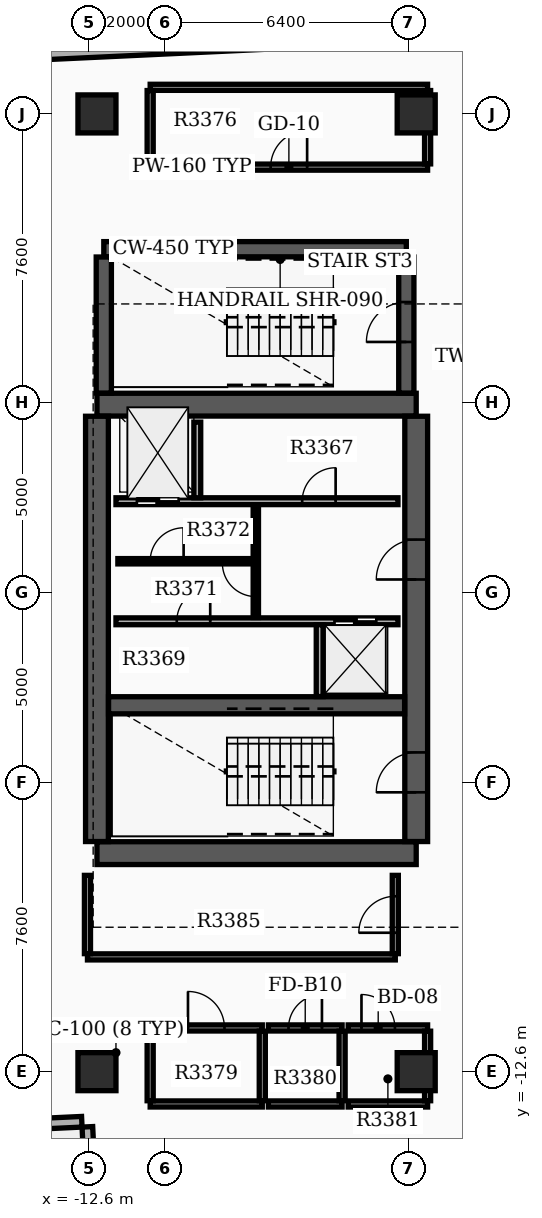
"""IFC4 building model, lengths in metres.
Left out: names, types, materials, properties, quantities, classifications, styles, units other than length and angle.
Written with IfcOpenShell. Run it as: python <this file> out.ifc"""

import sys

from ifc_helpers import new_model, si_unit, direction, frame, frame_2d, origin, origin_2d, place, context, subcontext, project, spatial, rectangle, extrude, element, fill, save


model = new_model("IFC4")
c1 = context("Model", 3, precision=1e-05, world=origin(), true_north=direction((0.0, 1.0)))
c2 = subcontext(c1, "Body", "Model", "MODEL_VIEW")
j1 = project(units=[si_unit("LENGTHUNIT", "METRE"), si_unit("PLANEANGLEUNIT", "RADIAN")], contexts=[c1])
p1 = place(None, origin())
s1 = spatial("IfcSite", under=j1, at=p1, CompositionType="ELEMENT")
p2 = place(p1, origin())
s2 = spatial("IfcBuilding", under=s1, at=p2, CompositionType="ELEMENT")
p3 = place(p2, frame((0.0, 0.0, 213.0)))
s3 = spatial("IfcBuildingStorey", under=s2, at=p3, CompositionType="ELEMENT", Elevation=213.0)
for number, where, z_axis, x_axis in (
    (1, (-12.4, -6.85, 0.0), (0.0, 0.0, 1.0), (1.0, 0.0, 0.0)),
    (2, (-12.4, 4.95, 0.0), (0.0, 0.0, 1.0), (1.0, 0.0, 0.0)),
):
    element("IfcWall", number, at=place(p3, frame(where, z_axis=z_axis, x_axis=x_axis)), inside=s3, PredefinedType="SHEAR", context=c2, shape_type="SweptSolid", body=[
        extrude(rectangle(XDim=8.4, YDim=0.6, at=frame_2d((4.2, 0.0))), origin(), (0.0, 0.0, 1.0), 3.7),
    ])
p4 = place(p3, frame((-12.4, -6.545, 0.0), z_axis=(0.0, 0.0, 1.0), x_axis=(0.0, 1.0, 0.0)))
e3 = element("IfcWall", 3, at=p4, inside=s3, PredefinedType="SHEAR", context=c2, shape_type="SweptSolid", body=[
    extrude(rectangle(XDim=11.19, YDim=0.6, at=frame_2d((5.595, 0.0))), origin(), (0.0, 0.0, 1.0), 3.7),
])
p5 = place(p3, frame((-4.0, -6.545, 0.0), z_axis=(0.0, 0.0, 1.0), x_axis=(0.0, 1.0, 0.0)))
e4 = element("IfcWall", 4, at=p5, inside=s3, PredefinedType="SHEAR", context=c2, shape_type="SweptSolid", body=[
    extrude(rectangle(XDim=11.19, YDim=0.6, at=frame_2d((5.595, 0.0))), origin(), (0.0, 0.0, 1.0), 3.7),
])
p6 = place(p5, frame((1.295, 0.0, 0.0)))
e5 = element("IfcOpeningElement", 5, at=p6, cuts=e4, PredefinedType="OPENING", context=c2, shape_type="SweptSolid", body=[
    extrude(rectangle(XDim=1.05, YDim=2.15, at=frame_2d((0.525, 1.075))), frame((0.0, 0.31, 0.0), z_axis=(0.0, -1.0, 0.0), x_axis=(1.0, 0.0, 0.0)), (0.0, 0.0, 1.0), 0.62),
])
p7 = place(p5, frame((6.895, 0.0, 0.0)))
e6 = element("IfcOpeningElement", 6, at=p7, cuts=e4, PredefinedType="OPENING", context=c2, shape_type="SweptSolid", body=[
    extrude(rectangle(XDim=1.05, YDim=2.15, at=frame_2d((0.525, 1.075))), frame((0.0, 0.31, 0.0), z_axis=(0.0, -1.0, 0.0), x_axis=(1.0, 0.0, 0.0)), (0.0, 0.0, 1.0), 0.62),
])
p8 = place(p3, frame((-12.095, -2.96, 0.0), z_axis=(0.0, 0.0, 1.0), x_axis=(1.0, 0.0, 0.0)))
e7 = element("IfcWall", 7, at=p8, inside=s3, PredefinedType="SHEAR", context=c2, shape_type="SweptSolid", body=[
    extrude(rectangle(XDim=7.79, YDim=0.45, at=frame_2d((3.895, 0.0))), origin(), (0.0, 0.0, 1.0), 3.7),
])
p9 = place(p3, frame((-12.22, 9.04, 0.0), z_axis=(0.0, 0.0, 1.0), x_axis=(1.0, 0.0, 0.0)))
e8 = element("IfcWall", 8, at=p9, inside=s3, PredefinedType="SHEAR", context=c2, shape_type="SweptSolid", body=[
    extrude(rectangle(XDim=7.96, YDim=0.4, at=frame_2d((3.98, 0.0))), origin(), (0.0, 0.0, 1.0), 3.7),
])
p10 = place(p3, frame((-12.22, 5.255, 0.0), z_axis=(0.0, 0.0, 1.0), x_axis=(0.0, 1.0, 0.0)))
e9 = element("IfcWall", 9, at=p10, inside=s3, PredefinedType="SHEAR", context=c2, shape_type="SweptSolid", body=[
    extrude(rectangle(XDim=3.58, YDim=0.4, at=frame_2d((1.79, 0.0))), origin(), (0.0, 0.0, 1.0), 3.7),
])
p11 = place(p3, frame((-4.26, 5.255, 0.0), z_axis=(0.0, 0.0, 1.0), x_axis=(0.0, 1.0, 0.0)))
e10 = element("IfcWall", 10, at=p11, inside=s3, PredefinedType="SHEAR", context=c2, shape_type="SweptSolid", body=[
    extrude(rectangle(XDim=3.58, YDim=0.4, at=frame_2d((1.79, 0.0))), origin(), (0.0, 0.0, 1.0), 3.7),
])
p12 = place(p11, frame((1.345, 0.0, 0.0)))
e11 = element("IfcOpeningElement", 11, at=p12, cuts=e10, PredefinedType="OPENING", context=c2, shape_type="SweptSolid", body=[
    extrude(rectangle(XDim=1.05, YDim=2.15, at=frame_2d((0.525, 1.075))), frame((0.0, 0.21, 0.0), z_axis=(0.0, -1.0, 0.0), x_axis=(1.0, 0.0, 0.0)), (0.0, 0.0, 1.0), 0.42),
])
for number, where, z_axis, x_axis in (
    (12, (-12.4, -12.6, 0.0), (0.0, 0.0, 1.0), (1.0, 0.0, 0.0)),
    (13, (-12.4, 12.6, 0.0), (0.0, 0.0, 1.0), (1.0, 0.0, 0.0)),
    (14, (-4.0, -12.6, 0.0), (0.0, 0.0, 1.0), (1.0, 0.0, 0.0)),
    (15, (-4.0, 12.6, 0.0), (0.0, 0.0, 1.0), (1.0, 0.0, 0.0)),
):
    element("IfcColumn", number, at=place(p3, frame(where, z_axis=z_axis, x_axis=x_axis)), inside=s3, PredefinedType="COLUMN", context=c2, shape_type="SweptSolid", body=[
        extrude(rectangle(XDim=1.0, YDim=1.0, at=origin_2d()), origin(), (0.0, 0.0, 1.0), 3.9),
    ])
p13 = place(p3, frame((-13.843, 14.164, 0.0), z_axis=(0.0, 0.0, 1.0), x_axis=(0.998889082162, 0.047123258997, 0.0)))
e16 = element("IfcWall", 16, at=p13, inside=s3, PredefinedType="STANDARD", context=c2, shape_type="SweptSolid", body=[
    extrude(rectangle(XDim=6.3, YDim=0.28, at=frame_2d((3.15, 0.0))), origin(), (0.0, 0.0, 1.0), 3.18),
])
p14 = place(p3, frame((-14.017, -13.976, 0.0), z_axis=(0.0, 0.0, 1.0), x_axis=(0.998883930236, 0.047232339719, 0.0)))
e17 = element("IfcWall", 17, at=p14, inside=s3, PredefinedType="STANDARD", context=c2, shape_type="SweptSolid", body=[
    extrude(rectangle(XDim=1.22, YDim=0.28, at=frame_2d((0.61, 0.0))), origin(), (0.0, 0.0, 1.0), 3.18),
])
p15 = place(p3, frame((-12.652, -14.052, 0.0), z_axis=(0.0, 0.0, 1.0), x_axis=(0.047039284441, -0.99889304018, 0.0)))
e18 = element("IfcWall", 18, at=p15, inside=s3, PredefinedType="STANDARD", context=c2, shape_type="SweptSolid", body=[
    extrude(rectangle(XDim=1.5, YDim=0.28, at=frame_2d((0.75, 0.0))), origin(), (0.0, 0.0, 1.0), 3.18),
])
p16 = place(p3, frame((-11.9, 2.41, 0.0), z_axis=(0.0, 0.0, 1.0), x_axis=(1.0, 0.0, 0.0)))
e19 = element("IfcWall", 19, at=p16, inside=s3, PredefinedType="SOLIDWALL", context=c2, shape_type="SweptSolid", body=[
    extrude(rectangle(XDim=7.42, YDim=0.18, at=frame_2d((3.71, 0.0))), origin(), (0.0, 0.0, 1.0), 3.17),
])
p17 = place(p16, frame((0.55, 0.0, 0.0)))
e20 = element("IfcOpeningElement", 20, at=p17, cuts=e19, PredefinedType="OPENING", context=c2, shape_type="SweptSolid", body=[
    extrude(rectangle(XDim=1.1, YDim=2.15, at=frame_2d((0.55, 1.075))), frame((0.0, 0.1, 0.0), z_axis=(0.0, -1.0, 0.0), x_axis=(1.0, 0.0, 0.0)), (0.0, 0.0, 1.0), 0.2),
])
p18 = place(p16, frame((4.9, 0.0, 0.0)))
e21 = element("IfcOpeningElement", 21, at=p18, cuts=e19, PredefinedType="OPENING", context=c2, shape_type="SweptSolid", body=[
    extrude(rectangle(XDim=0.88, YDim=2.1, at=frame_2d((0.44, 1.05))), frame((0.0, 0.1, 0.0), z_axis=(0.0, -1.0, 0.0), x_axis=(1.0, 0.0, 0.0)), (0.0, 0.0, 1.0), 0.2),
])
p19 = place(p3, frame((-11.9, -0.75, 0.0), z_axis=(0.0, 0.0, 1.0), x_axis=(1.0, 0.0, 0.0)))
e22 = element("IfcWall", 22, at=p19, inside=s3, PredefinedType="SOLIDWALL", context=c2, shape_type="SweptSolid", body=[
    extrude(rectangle(XDim=7.42, YDim=0.18, at=frame_2d((3.71, 0.0))), origin(), (0.0, 0.0, 1.0), 3.17),
])
p20 = place(p19, frame((5.75, 0.0, 0.0)))
e23 = element("IfcOpeningElement", 23, at=p20, cuts=e22, PredefinedType="OPENING", context=c2, shape_type="SweptSolid", body=[
    extrude(rectangle(XDim=1.1, YDim=2.15, at=frame_2d((0.55, 1.075))), frame((0.0, 0.1, 0.0), z_axis=(0.0, -1.0, 0.0), x_axis=(1.0, 0.0, 0.0)), (0.0, 0.0, 1.0), 0.2),
])
p21 = place(p19, frame((1.6, 0.0, 0.0)))
e24 = element("IfcOpeningElement", 24, at=p21, cuts=e22, PredefinedType="OPENING", context=c2, shape_type="SweptSolid", body=[
    extrude(rectangle(XDim=0.88, YDim=2.1, at=frame_2d((0.44, 1.05))), frame((0.0, 0.1, 0.0), z_axis=(0.0, -1.0, 0.0), x_axis=(1.0, 0.0, 0.0)), (0.0, 0.0, 1.0), 0.2),
])
p22 = place(p3, frame((-9.76, 2.5, 0.0), z_axis=(0.0, 0.0, 1.0), x_axis=(0.0, 1.0, 0.0)))
e25 = element("IfcWall", 25, at=p22, inside=s3, PredefinedType="SOLIDWALL", context=c2, shape_type="SweptSolid", body=[
    extrude(rectangle(XDim=1.99, YDim=0.18, at=frame_2d((0.995, 0.0))), origin(), (0.0, 0.0, 1.0), 3.17),
])
p23 = place(p3, frame((-6.54, -2.73, 0.0), z_axis=(0.0, 0.0, 1.0), x_axis=(0.0, 1.0, 0.0)))
e26 = element("IfcWall", 26, at=p23, inside=s3, PredefinedType="SOLIDWALL", context=c2, shape_type="SweptSolid", body=[
    extrude(rectangle(XDim=1.89, YDim=0.18, at=frame_2d((0.945, 0.0))), origin(), (0.0, 0.0, 1.0), 3.17),
])
p24 = place(p3, frame((-8.22, -0.65, 0.0), z_axis=(0.0, 0.0, 1.0), x_axis=(0.0, 1.0, 0.0)))
e27 = element("IfcWall", 27, at=p24, inside=s3, PredefinedType="SOLIDWALL", context=c2, shape_type="SweptSolid", body=[
    extrude(rectangle(XDim=2.96, YDim=0.14, at=frame_2d((1.48, 0.0))), origin(), (0.0, 0.0, 1.0), 3.17),
])
p25 = place(p24, frame((0.55, 0.0, 0.0)))
e28 = element("IfcOpeningElement", 28, at=p25, cuts=e27, PredefinedType="OPENING", context=c2, shape_type="SweptSolid", body=[
    extrude(rectangle(XDim=0.88, YDim=2.1, at=frame_2d((0.44, 1.05))), frame((0.0, 0.08, 0.0), z_axis=(0.0, -1.0, 0.0), x_axis=(1.0, 0.0, 0.0)), (0.0, 0.0, 1.0), 0.16),
])
p26 = place(p3, frame((-11.85, 0.83, 0.0), z_axis=(0.0, 0.0, 1.0), x_axis=(1.0, 0.0, 0.0)))
e29 = element("IfcWall", 29, at=p26, inside=s3, PredefinedType="PARTITIONING", context=c2, shape_type="SweptSolid", body=[
    extrude(rectangle(XDim=3.552, YDim=0.14, at=frame_2d((1.776, 0.0))), origin(), (0.0, 0.0, 1.0), 3.17),
])
p27 = place(p26, frame((0.85, 0.0, 0.0)))
e30 = element("IfcOpeningElement", 30, at=p27, cuts=e29, PredefinedType="OPENING", context=c2, shape_type="SweptSolid", body=[
    extrude(rectangle(XDim=0.88, YDim=2.1, at=frame_2d((0.44, 1.05))), frame((0.0, 0.08, 0.0), z_axis=(0.0, -1.0, 0.0), x_axis=(1.0, 0.0, 0.0)), (0.0, 0.0, 1.0), 0.16),
])
p28 = place(p3, frame((-11.0, 11.2, 0.0), z_axis=(0.0, 0.0, 1.0), x_axis=(1.0, 0.0, 0.0)))
e31 = element("IfcWall", 31, at=p28, inside=s3, PredefinedType="PARTITIONING", context=c2, shape_type="SweptSolid", body=[
    extrude(rectangle(XDim=7.3, YDim=0.16, at=frame_2d((3.65, 0.0))), origin(), (0.0, 0.0, 1.0), 3.17),
])
p29 = place(p28, frame((3.17, 0.0, 0.0)))
e32 = element("IfcOpeningElement", 32, at=p29, cuts=e31, PredefinedType="OPENING", context=c2, shape_type="SweptSolid", body=[
    extrude(rectangle(XDim=0.96, YDim=2.15, at=frame_2d((0.48, 1.075))), frame((0.0, 0.09, 0.0), z_axis=(0.0, -1.0, 0.0), x_axis=(1.0, 0.0, 0.0)), (0.0, 0.0, 1.0), 0.18),
])
p30 = place(p3, frame((-11.0, 13.3, 0.0), z_axis=(0.0, 0.0, 1.0), x_axis=(1.0, 0.0, 0.0)))
e33 = element("IfcWall", 33, at=p30, inside=s3, PredefinedType="PARTITIONING", context=c2, shape_type="SweptSolid", body=[
    extrude(rectangle(XDim=7.3, YDim=0.16, at=frame_2d((3.65, 0.0))), origin(), (0.0, 0.0, 1.0), 3.17),
])
for number, where, z_axis, x_axis in (
    (34, (-11.0, 11.285, 0.0), (0.0, 0.0, 1.0), (0.0, 1.0, 0.0)),
    (35, (-3.7, 11.285, 0.0), (0.0, 0.0, 1.0), (0.0, 1.0, 0.0)),
):
    element("IfcWall", number, at=place(p3, frame(where, z_axis=z_axis, x_axis=x_axis)), inside=s3, PredefinedType="PARTITIONING", context=c2, shape_type="SweptSolid", body=[
        extrude(rectangle(XDim=1.93, YDim=0.16, at=frame_2d((0.965, 0.0))), origin(), (0.0, 0.0, 1.0), 3.17),
    ])
p31 = place(p3, frame((-11.0, -13.45, 0.0), z_axis=(0.0, 0.0, 1.0), x_axis=(1.0, 0.0, 0.0)))
e36 = element("IfcWall", 36, at=p31, inside=s3, PredefinedType="PARTITIONING", context=c2, shape_type="SweptSolid", body=[
    extrude(rectangle(XDim=2.95, YDim=0.16, at=frame_2d((1.475, 0.0))), origin(), (0.0, 0.0, 1.0), 3.17),
])
p32 = place(p3, frame((-11.0, -11.45, 0.0), z_axis=(0.0, 0.0, 1.0), x_axis=(1.0, 0.0, 0.0)))
e37 = element("IfcWall", 37, at=p32, inside=s3, PredefinedType="PARTITIONING", context=c2, shape_type="SweptSolid", body=[
    extrude(rectangle(XDim=2.95, YDim=0.16, at=frame_2d((1.475, 0.0))), origin(), (0.0, 0.0, 1.0), 3.17),
])
p33 = place(p32, frame((0.995, 0.0, 0.0)))
e38 = element("IfcOpeningElement", 38, at=p33, cuts=e37, PredefinedType="OPENING", context=c2, shape_type="SweptSolid", body=[
    extrude(rectangle(XDim=0.96, YDim=2.15, at=frame_2d((0.48, 1.075))), frame((0.0, 0.09, 0.0), z_axis=(0.0, -1.0, 0.0), x_axis=(1.0, 0.0, 0.0)), (0.0, 0.0, 1.0), 0.18),
])
for number, where, z_axis, x_axis in (
    (39, (-11.0, -13.365, 0.0), (0.0, 0.0, 1.0), (0.0, 1.0, 0.0)),
    (40, (-8.05, -13.365, 0.0), (0.0, 0.0, 1.0), (0.0, 1.0, 0.0)),
):
    element("IfcWall", number, at=place(p3, frame(where, z_axis=z_axis, x_axis=x_axis)), inside=s3, PredefinedType="PARTITIONING", context=c2, shape_type="SweptSolid", body=[
        extrude(rectangle(XDim=1.83, YDim=0.16, at=frame_2d((0.915, 0.0))), origin(), (0.0, 0.0, 1.0), 3.17),
    ])
p34 = place(p3, frame((-7.89, -13.45, 0.0), z_axis=(0.0, 0.0, 1.0), x_axis=(1.0, 0.0, 0.0)))
e41 = element("IfcWall", 41, at=p34, inside=s3, PredefinedType="PARTITIONING", context=c2, shape_type="SweptSolid", body=[
    extrude(rectangle(XDim=1.94, YDim=0.16, at=frame_2d((0.97, 0.0))), origin(), (0.0, 0.0, 1.0), 3.17),
])
p35 = place(p3, frame((-7.89, -11.45, 0.0), z_axis=(0.0, 0.0, 1.0), x_axis=(1.0, 0.0, 0.0)))
e42 = element("IfcWall", 42, at=p35, inside=s3, PredefinedType="PARTITIONING", context=c2, shape_type="SweptSolid", body=[
    extrude(rectangle(XDim=1.94, YDim=0.16, at=frame_2d((0.97, 0.0))), origin(), (0.0, 0.0, 1.0), 3.17),
])
p36 = place(p35, frame((0.53, 0.0, 0.0)))
e43 = element("IfcOpeningElement", 43, at=p36, cuts=e42, PredefinedType="OPENING", context=c2, shape_type="SweptSolid", body=[
    extrude(rectangle(XDim=0.88, YDim=2.1, at=frame_2d((0.44, 1.05))), frame((0.0, 0.09, 0.0), z_axis=(0.0, -1.0, 0.0), x_axis=(1.0, 0.0, 0.0)), (0.0, 0.0, 1.0), 0.18),
])
p37 = place(p3, frame((-5.95, -13.365, 0.0), z_axis=(0.0, 0.0, 1.0), x_axis=(0.0, 1.0, 0.0)))
e44 = element("IfcWall", 44, at=p37, inside=s3, PredefinedType="PARTITIONING", context=c2, shape_type="SweptSolid", body=[
    extrude(rectangle(XDim=1.83, YDim=0.16, at=frame_2d((0.915, 0.0))), origin(), (0.0, 0.0, 1.0), 3.17),
])
p38 = place(p3, frame((-5.79, -13.45, 0.0), z_axis=(0.0, 0.0, 1.0), x_axis=(1.0, 0.0, 0.0)))
e45 = element("IfcWall", 45, at=p38, inside=s3, PredefinedType="PARTITIONING", context=c2, shape_type="SweptSolid", body=[
    extrude(rectangle(XDim=2.09, YDim=0.16, at=frame_2d((1.045, 0.0))), origin(), (0.0, 0.0, 1.0), 3.17),
])
p39 = place(p3, frame((-5.79, -11.45, 0.0), z_axis=(0.0, 0.0, 1.0), x_axis=(1.0, 0.0, 0.0)))
e46 = element("IfcWall", 46, at=p39, inside=s3, PredefinedType="PARTITIONING", context=c2, shape_type="SweptSolid", body=[
    extrude(rectangle(XDim=2.09, YDim=0.16, at=frame_2d((1.045, 0.0))), origin(), (0.0, 0.0, 1.0), 3.17),
])
p40 = place(p39, frame((0.35, 0.0, 0.0)))
e47 = element("IfcOpeningElement", 47, at=p40, cuts=e46, PredefinedType="OPENING", context=c2, shape_type="SweptSolid", body=[
    extrude(rectangle(XDim=0.88, YDim=2.15, at=frame_2d((0.44, 1.075))), frame((0.0, 0.09, 0.0), z_axis=(0.0, -1.0, 0.0), x_axis=(1.0, 0.0, 0.0)), (0.0, 0.0, 1.0), 0.18),
])
p41 = place(p3, frame((-3.7, -13.365, 0.0), z_axis=(0.0, 0.0, 1.0), x_axis=(0.0, 1.0, 0.0)))
e48 = element("IfcWall", 48, at=p41, inside=s3, PredefinedType="PARTITIONING", context=c2, shape_type="SweptSolid", body=[
    extrude(rectangle(XDim=1.83, YDim=0.16, at=frame_2d((0.915, 0.0))), origin(), (0.0, 0.0, 1.0), 3.17),
])
p42 = place(p3, frame((-12.65, -9.58, 0.0), z_axis=(0.0, 0.0, 1.0), x_axis=(1.0, 0.0, 0.0)))
e49 = element("IfcWall", 49, at=p42, inside=s3, PredefinedType="PARTITIONING", context=c2, shape_type="SweptSolid", body=[
    extrude(rectangle(XDim=8.1, YDim=0.16, at=frame_2d((4.05, 0.0))), origin(), (0.0, 0.0, 1.0), 3.17),
])
p43 = place(p3, frame((-12.65, -9.495, 0.0), z_axis=(0.0, 0.0, 1.0), x_axis=(0.0, 1.0, 0.0)))
e50 = element("IfcWall", 50, at=p43, inside=s3, PredefinedType="PARTITIONING", context=c2, shape_type="SweptSolid", body=[
    extrude(rectangle(XDim=2.06, YDim=0.16, at=frame_2d((1.03, 0.0))), origin(), (0.0, 0.0, 1.0), 3.17),
])
p44 = place(p3, frame((-4.55, -9.495, 0.0), z_axis=(0.0, 0.0, 1.0), x_axis=(0.0, 1.0, 0.0)))
e51 = element("IfcWall", 51, at=p44, inside=s3, PredefinedType="PARTITIONING", context=c2, shape_type="SweptSolid", body=[
    extrude(rectangle(XDim=2.06, YDim=0.16, at=frame_2d((1.03, 0.0))), origin(), (0.0, 0.0, 1.0), 3.17),
])
p45 = place(p44, frame((0.55, 0.0, 0.0)))
e52 = element("IfcOpeningElement", 52, at=p45, cuts=e51, PredefinedType="OPENING", context=c2, shape_type="SweptSolid", body=[
    extrude(rectangle(XDim=0.96, YDim=2.15, at=frame_2d((0.48, 1.075))), frame((0.0, 0.09, 0.0), z_axis=(0.0, -1.0, 0.0), x_axis=(1.0, 0.0, 0.0)), (0.0, 0.0, 1.0), 0.18),
])
p46 = place(p6, origin())
e53 = element("IfcDoor", 53, at=p46, inside=s3, OperationType="SINGLE_SWING_LEFT", PredefinedType="DOOR", context=c2, shape_type="SweptSolid", body=[
    extrude(rectangle(XDim=1.05, YDim=2.15, at=frame_2d((0.525, 1.075))), frame((0.0, 0.025, 0.0), z_axis=(0.0, -1.0, 0.0), x_axis=(1.0, 0.0, 0.0)), (0.0, 0.0, 1.0), 0.05),
])
fill(e5, e53)
p47 = place(p7, origin())
e54 = element("IfcDoor", 54, at=p47, inside=s3, OperationType="SINGLE_SWING_LEFT", PredefinedType="DOOR", context=c2, shape_type="SweptSolid", body=[
    extrude(rectangle(XDim=1.05, YDim=2.15, at=frame_2d((0.525, 1.075))), frame((0.0, 0.025, 0.0), z_axis=(0.0, -1.0, 0.0), x_axis=(1.0, 0.0, 0.0)), (0.0, 0.0, 1.0), 0.05),
])
fill(e6, e54)
p48 = place(p12, origin())
e55 = element("IfcDoor", 55, at=p48, inside=s3, OperationType="SINGLE_SWING_LEFT", PredefinedType="DOOR", context=c2, shape_type="SweptSolid", body=[
    extrude(rectangle(XDim=1.05, YDim=2.15, at=frame_2d((0.525, 1.075))), frame((0.0, 0.025, 0.0), z_axis=(0.0, -1.0, 0.0), x_axis=(1.0, 0.0, 0.0)), (0.0, 0.0, 1.0), 0.05),
])
fill(e11, e55)
p49 = place(p17, origin())
e56 = element("IfcDoor", 56, at=p49, inside=s3, OperationType="DOUBLE_DOOR_SLIDING", PredefinedType="DOOR", context=c2, shape_type="SweptSolid", body=[
    extrude(rectangle(XDim=1.1, YDim=2.15, at=frame_2d((0.55, 1.075))), frame((0.0, 0.025, 0.0), z_axis=(0.0, -1.0, 0.0), x_axis=(1.0, 0.0, 0.0)), (0.0, 0.0, 1.0), 0.05),
])
fill(e20, e56)
p50 = place(p20, origin())
e57 = element("IfcDoor", 57, at=p50, inside=s3, OperationType="DOUBLE_DOOR_SLIDING", PredefinedType="DOOR", context=c2, shape_type="SweptSolid", body=[
    extrude(rectangle(XDim=1.1, YDim=2.15, at=frame_2d((0.55, 1.075))), frame((0.0, 0.025, 0.0), z_axis=(0.0, -1.0, 0.0), x_axis=(1.0, 0.0, 0.0)), (0.0, 0.0, 1.0), 0.05),
])
fill(e23, e57)
p51 = place(p18, origin())
e58 = element("IfcDoor", 58, at=p51, inside=s3, OperationType="SINGLE_SWING_RIGHT", PredefinedType="DOOR", context=c2, shape_type="SweptSolid", body=[
    extrude(rectangle(XDim=0.88, YDim=2.1, at=frame_2d((0.44, 1.05))), frame((0.0, 0.025, 0.0), z_axis=(0.0, -1.0, 0.0), x_axis=(1.0, 0.0, 0.0)), (0.0, 0.0, 1.0), 0.05),
])
fill(e21, e58)
p52 = place(p21, origin())
e59 = element("IfcDoor", 59, at=p52, inside=s3, OperationType="SINGLE_SWING_RIGHT", PredefinedType="DOOR", context=c2, shape_type="SweptSolid", body=[
    extrude(rectangle(XDim=0.88, YDim=2.1, at=frame_2d((0.44, 1.05))), frame((0.0, 0.025, 0.0), z_axis=(0.0, -1.0, 0.0), x_axis=(1.0, 0.0, 0.0)), (0.0, 0.0, 1.0), 0.05),
])
fill(e24, e59)
p53 = place(p25, origin())
e60 = element("IfcDoor", 60, at=p53, inside=s3, OperationType="SINGLE_SWING_RIGHT", PredefinedType="DOOR", context=c2, shape_type="SweptSolid", body=[
    extrude(rectangle(XDim=0.88, YDim=2.1, at=frame_2d((0.44, 1.05))), frame((0.0, 0.025, 0.0), z_axis=(0.0, -1.0, 0.0), x_axis=(1.0, 0.0, 0.0)), (0.0, 0.0, 1.0), 0.05),
])
fill(e28, e60)
p54 = place(p27, origin())
e61 = element("IfcDoor", 61, at=p54, inside=s3, OperationType="SINGLE_SWING_RIGHT", PredefinedType="DOOR", context=c2, shape_type="SweptSolid", body=[
    extrude(rectangle(XDim=0.88, YDim=2.1, at=frame_2d((0.44, 1.05))), frame((0.0, 0.025, 0.0), z_axis=(0.0, -1.0, 0.0), x_axis=(1.0, 0.0, 0.0)), (0.0, 0.0, 1.0), 0.05),
])
fill(e30, e61)
p55 = place(p29, origin())
e62 = element("IfcDoor", 62, at=p55, inside=s3, OperationType="SINGLE_SWING_RIGHT", PredefinedType="DOOR", context=c2, shape_type="SweptSolid", body=[
    extrude(rectangle(XDim=0.96, YDim=2.15, at=frame_2d((0.48, 1.075))), frame((0.0, 0.025, 0.0), z_axis=(0.0, -1.0, 0.0), x_axis=(1.0, 0.0, 0.0)), (0.0, 0.0, 1.0), 0.05),
])
fill(e32, e62)
p56 = place(p33, origin())
e63 = element("IfcDoor", 63, at=p56, inside=s3, OperationType="SINGLE_SWING_LEFT", PredefinedType="DOOR", context=c2, shape_type="SweptSolid", body=[
    extrude(rectangle(XDim=0.96, YDim=2.15, at=frame_2d((0.48, 1.075))), frame((0.0, 0.025, 0.0), z_axis=(0.0, -1.0, 0.0), x_axis=(1.0, 0.0, 0.0)), (0.0, 0.0, 1.0), 0.05),
])
fill(e38, e63)
p57 = place(p36, origin())
e64 = element("IfcDoor", 64, at=p57, inside=s3, OperationType="SINGLE_SWING_RIGHT", PredefinedType="DOOR", context=c2, shape_type="SweptSolid", body=[
    extrude(rectangle(XDim=0.88, YDim=2.1, at=frame_2d((0.44, 1.05))), frame((0.0, 0.025, 0.0), z_axis=(0.0, -1.0, 0.0), x_axis=(1.0, 0.0, 0.0)), (0.0, 0.0, 1.0), 0.05),
])
fill(e43, e64)
p58 = place(p40, origin())
e65 = element("IfcDoor", 65, at=p58, inside=s3, OperationType="SINGLE_SWING_LEFT", PredefinedType="DOOR", context=c2, shape_type="SweptSolid", body=[
    extrude(rectangle(XDim=0.88, YDim=2.15, at=frame_2d((0.44, 1.075))), frame((0.0, 0.025, 0.0), z_axis=(0.0, -1.0, 0.0), x_axis=(1.0, 0.0, 0.0)), (0.0, 0.0, 1.0), 0.05),
])
fill(e47, e65)
p59 = place(p45, origin())
e66 = element("IfcDoor", 66, at=p59, inside=s3, OperationType="SINGLE_SWING_LEFT", PredefinedType="DOOR", context=c2, shape_type="SweptSolid", body=[
    extrude(rectangle(XDim=0.96, YDim=2.15, at=frame_2d((0.48, 1.075))), frame((0.0, 0.025, 0.0), z_axis=(0.0, -1.0, 0.0), x_axis=(1.0, 0.0, 0.0)), (0.0, 0.0, 1.0), 0.05),
])
fill(e52, e66)
save(model, sys.argv[1])
